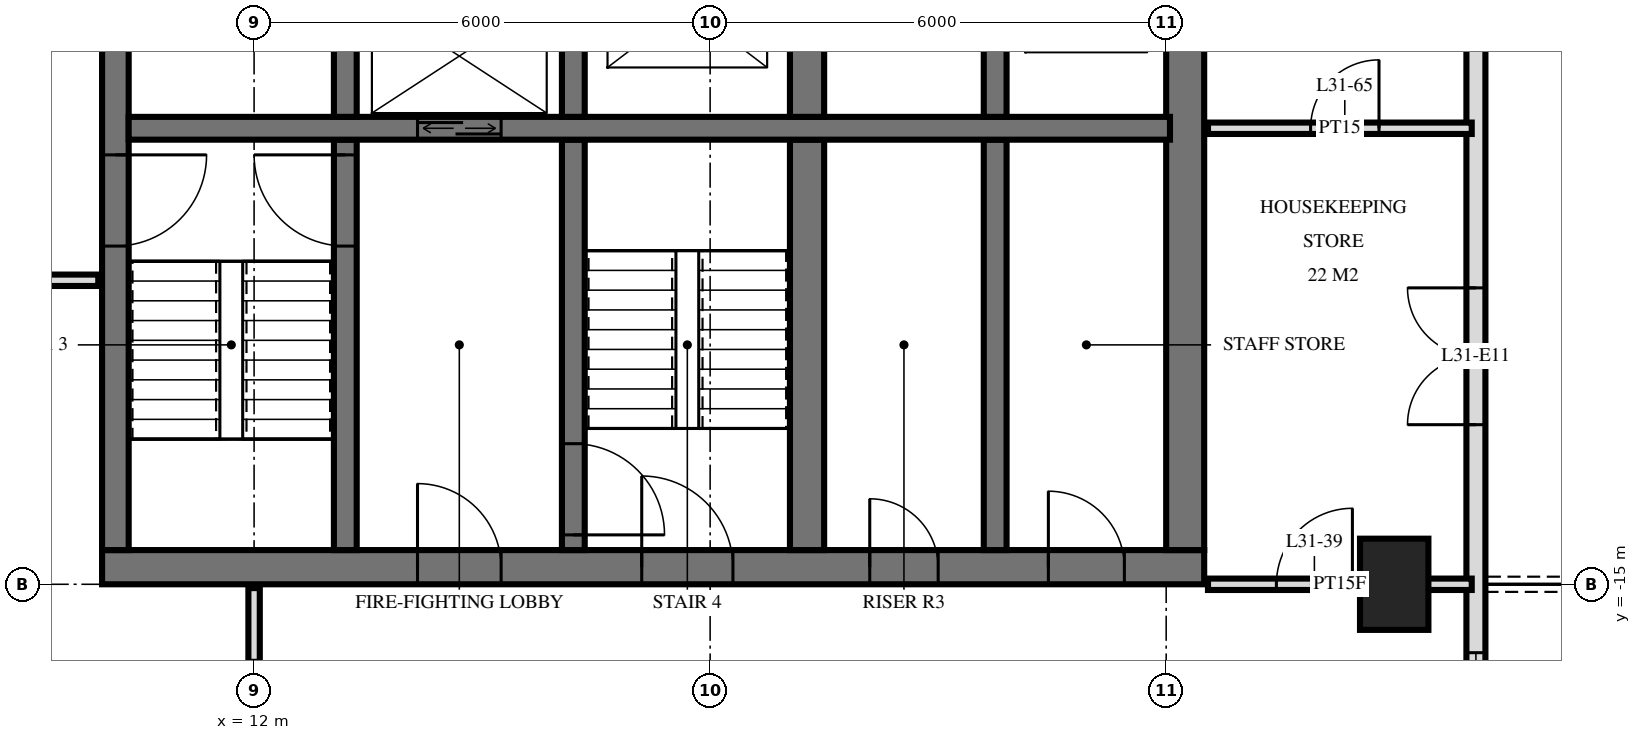
"""IFC4 building model, lengths in metres.
Left out: names, types, materials, properties, quantities, classifications, styles, units other than length and angle.
Written with IfcOpenShell. Run it as: python <this file> out.ifc"""

import sys

from ifc_helpers import new_model, si_unit, direction, frame, frame_2d, origin, origin_2d, place, context, subcontext, project, spatial, rectangle, extrude, element, fill, save


model = new_model("IFC4")
c1 = context("Model", 3, precision=1e-05, world=origin(), true_north=direction((0.0, 1.0)))
c2 = subcontext(c1, "Body", "Model", "MODEL_VIEW")
j1 = project(units=[si_unit("LENGTHUNIT", "METRE"), si_unit("PLANEANGLEUNIT", "RADIAN")], contexts=[c1])
p1 = place(None, origin())
s1 = spatial("IfcSite", under=j1, at=p1, CompositionType="ELEMENT")
p2 = place(p1, origin())
s2 = spatial("IfcBuilding", under=s1, at=p2, CompositionType="ELEMENT")
p3 = place(p2, frame((0.0, 0.0, 123.6)))
s3 = spatial("IfcBuildingStorey", under=s2, at=p3, CompositionType="ELEMENT", Elevation=123.6)
p4 = place(p3, frame((27.0, -15.0, 0.0), z_axis=(0.0, 0.0, 1.0), x_axis=(0.0, 1.0, 0.0)))
e1 = element("IfcColumn", 1, at=p4, inside=s3, PredefinedType="COLUMN", context=c2, shape_type="SweptSolid", body=[
    extrude(rectangle(XDim=1.2, YDim=0.9, at=origin_2d()), origin(), (0.0, 0.0, 1.0), 3.6),
])
p5 = place(p3, frame((10.0, -14.775, 0.0), z_axis=(0.0, 0.0, 1.0), x_axis=(1.0, 0.0, 0.0)))
e2 = element("IfcWall", 2, at=p5, inside=s3, PredefinedType="SHEAR", context=c2, shape_type="SweptSolid", body=[
    extrude(rectangle(XDim=14.5, YDim=0.45, at=frame_2d((7.25, 0.0))), origin(), (0.0, 0.0, 1.0), 3.6),
])
p6 = place(p5, frame((7.1, 0.0, 0.0)))
e3 = element("IfcOpeningElement", 3, at=p6, cuts=e2, PredefinedType="OPENING", context=c2, shape_type="SweptSolid", body=[
    extrude(rectangle(XDim=1.2, YDim=2.1, at=frame_2d((0.6, 1.05))), frame((0.0, 0.235, 0.0), z_axis=(0.0, -1.0, 0.0), x_axis=(1.0, 0.0, 0.0)), (0.0, 0.0, 1.0), 0.47),
])
p7 = place(p5, frame((4.15, 0.0, 0.0)))
e4 = element("IfcOpeningElement", 4, at=p7, cuts=e2, PredefinedType="OPENING", context=c2, shape_type="SweptSolid", body=[
    extrude(rectangle(XDim=1.1, YDim=2.1, at=frame_2d((0.55, 1.05))), frame((0.0, 0.235, 0.0), z_axis=(0.0, -1.0, 0.0), x_axis=(1.0, 0.0, 0.0)), (0.0, 0.0, 1.0), 0.47),
])
p8 = place(p5, frame((10.1, 0.0, 0.0)))
e5 = element("IfcOpeningElement", 5, at=p8, cuts=e2, PredefinedType="OPENING", context=c2, shape_type="SweptSolid", body=[
    extrude(rectangle(XDim=0.9, YDim=2.1, at=frame_2d((0.45, 1.05))), frame((0.0, 0.235, 0.0), z_axis=(0.0, -1.0, 0.0), x_axis=(1.0, 0.0, 0.0)), (0.0, 0.0, 1.0), 0.47),
])
p9 = place(p5, frame((12.45, 0.0, 0.0)))
e6 = element("IfcOpeningElement", 6, at=p9, cuts=e2, PredefinedType="OPENING", context=c2, shape_type="SweptSolid", body=[
    extrude(rectangle(XDim=1.0, YDim=2.1, at=frame_2d((0.5, 1.05))), frame((0.0, 0.235, 0.0), z_axis=(0.0, -1.0, 0.0), x_axis=(1.0, 0.0, 0.0)), (0.0, 0.0, 1.0), 0.47),
])
p10 = place(p3, frame((10.175, -14.55, 0.0), z_axis=(0.0, 0.0, 1.0), x_axis=(0.0, 1.0, 0.0)))
e7 = element("IfcWall", 7, at=p10, inside=s3, PredefinedType="SHEAR", context=c2, shape_type="SweptSolid", body=[
    extrude(rectangle(XDim=14.1, YDim=0.35, at=frame_2d((7.05, 0.0))), origin(), (0.0, 0.0, 1.0), 3.6),
])
p11 = place(p10, frame((8.4, 0.0, 0.0)))
e8 = element("IfcOpeningElement", 8, at=p11, cuts=e7, PredefinedType="OPENING", context=c2, shape_type="SweptSolid", body=[
    extrude(rectangle(XDim=1.4, YDim=2.4, at=frame_2d((0.7, 1.2))), frame((0.0, 0.185, 0.0), z_axis=(0.0, -1.0, 0.0), x_axis=(1.0, 0.0, 0.0)), (0.0, 0.0, 1.0), 0.37),
])
p12 = place(p10, frame((10.0, 0.0, 0.0)))
e9 = element("IfcOpeningElement", 9, at=p12, cuts=e7, PredefinedType="OPENING", context=c2, shape_type="SweptSolid", body=[
    extrude(rectangle(XDim=1.4, YDim=2.4, at=frame_2d((0.7, 1.2))), frame((0.0, 0.185, 0.0), z_axis=(0.0, -1.0, 0.0), x_axis=(1.0, 0.0, 0.0)), (0.0, 0.0, 1.0), 0.37),
])
p13 = place(p10, frame((4.0, 0.0, 0.0)))
e10 = element("IfcOpeningElement", 10, at=p13, cuts=e7, PredefinedType="OPENING", context=c2, shape_type="SweptSolid", body=[
    extrude(rectangle(XDim=1.2, YDim=2.1, at=frame_2d((0.6, 1.05))), frame((0.0, 0.185, 0.0), z_axis=(0.0, -1.0, 0.0), x_axis=(1.0, 0.0, 0.0)), (0.0, 0.0, 1.0), 0.37),
])
p14 = place(p3, frame((24.25, -14.55, 0.0), z_axis=(0.0, 0.0, 1.0), x_axis=(0.0, 1.0, 0.0)))
e11 = element("IfcWall", 11, at=p14, inside=s3, PredefinedType="SHEAR", context=c2, shape_type="SweptSolid", body=[
    extrude(rectangle(XDim=14.1, YDim=0.5, at=frame_2d((7.05, 0.0))), origin(), (0.0, 0.0, 1.0), 3.6),
])
p15 = place(p3, frame((10.35, -9.0, 0.0), z_axis=(0.0, 0.0, 1.0), x_axis=(1.0, 0.0, 0.0)))
e12 = element("IfcWall", 12, at=p15, inside=s3, PredefinedType="SHEAR", context=c2, shape_type="SweptSolid", body=[
    extrude(rectangle(XDim=13.7, YDim=0.3, at=frame_2d((6.85, 0.0))), origin(), (0.0, 0.0, 1.0), 3.6),
])
p16 = place(p15, frame((3.8, 0.0, 0.0)))
e13 = element("IfcOpeningElement", 13, at=p16, cuts=e12, PredefinedType="OPENING", context=c2, shape_type="SweptSolid", body=[
    extrude(rectangle(XDim=1.1, YDim=2.1, at=frame_2d((0.55, 1.05))), frame((0.0, 0.16, 0.0), z_axis=(0.0, -1.0, 0.0), x_axis=(1.0, 0.0, 0.0)), (0.0, 0.0, 1.0), 0.32),
])
p17 = place(p3, frame((13.2, -8.85, 0.0), z_axis=(0.0, 0.0, 1.0), x_axis=(0.0, 1.0, 0.0)))
e14 = element("IfcWall", 14, at=p17, inside=s3, PredefinedType="SHEAR", context=c2, shape_type="SweptSolid", body=[
    extrude(rectangle(XDim=2.3, YDim=0.3, at=frame_2d((1.15, 0.0))), origin(), (0.0, 0.0, 1.0), 3.6),
])
p18 = place(p3, frame((13.2, -14.55, 0.0), z_axis=(0.0, 0.0, 1.0), x_axis=(0.0, 1.0, 0.0)))
e15 = element("IfcWall", 15, at=p18, inside=s3, PredefinedType="SHEAR", context=c2, shape_type="SweptSolid", body=[
    extrude(rectangle(XDim=5.4, YDim=0.3, at=frame_2d((2.7, 0.0))), origin(), (0.0, 0.0, 1.0), 3.6),
])
p19 = place(p18, frame((4.0, 0.0, 0.0)))
e16 = element("IfcOpeningElement", 16, at=p19, cuts=e15, PredefinedType="OPENING", context=c2, shape_type="SweptSolid", body=[
    extrude(rectangle(XDim=1.2, YDim=2.1, at=frame_2d((0.6, 1.05))), frame((0.0, 0.16, 0.0), z_axis=(0.0, -1.0, 0.0), x_axis=(1.0, 0.0, 0.0)), (0.0, 0.0, 1.0), 0.32),
])
p20 = place(p3, frame((16.2, -8.85, 0.0), z_axis=(0.0, 0.0, 1.0), x_axis=(0.0, 1.0, 0.0)))
e17 = element("IfcWall", 17, at=p20, inside=s3, PredefinedType="SHEAR", context=c2, shape_type="SweptSolid", body=[
    extrude(rectangle(XDim=2.3, YDim=0.3, at=frame_2d((1.15, 0.0))), origin(), (0.0, 0.0, 1.0), 3.6),
])
p21 = place(p3, frame((16.2, -14.55, 0.0), z_axis=(0.0, 0.0, 1.0), x_axis=(0.0, 1.0, 0.0)))
e18 = element("IfcWall", 18, at=p21, inside=s3, PredefinedType="SHEAR", context=c2, shape_type="SweptSolid", body=[
    extrude(rectangle(XDim=5.4, YDim=0.3, at=frame_2d((2.7, 0.0))), origin(), (0.0, 0.0, 1.0), 3.6),
])
p22 = place(p21, frame((0.2, 0.0, 0.0)))
e19 = element("IfcOpeningElement", 19, at=p22, cuts=e18, PredefinedType="OPENING", context=c2, shape_type="SweptSolid", body=[
    extrude(rectangle(XDim=1.2, YDim=2.1, at=frame_2d((0.6, 1.05))), frame((0.0, 0.16, 0.0), z_axis=(0.0, -1.0, 0.0), x_axis=(1.0, 0.0, 0.0)), (0.0, 0.0, 1.0), 0.32),
])
p23 = place(p3, frame((19.275, -8.85, 0.0), z_axis=(0.0, 0.0, 1.0), x_axis=(0.0, 1.0, 0.0)))
e20 = element("IfcWall", 20, at=p23, inside=s3, PredefinedType="SHEAR", context=c2, shape_type="SweptSolid", body=[
    extrude(rectangle(XDim=2.3, YDim=0.45, at=frame_2d((1.15, 0.0))), origin(), (0.0, 0.0, 1.0), 3.6),
])
p24 = place(p3, frame((19.275, -14.55, 0.0), z_axis=(0.0, 0.0, 1.0), x_axis=(0.0, 1.0, 0.0)))
e21 = element("IfcWall", 21, at=p24, inside=s3, PredefinedType="SHEAR", context=c2, shape_type="SweptSolid", body=[
    extrude(rectangle(XDim=5.4, YDim=0.45, at=frame_2d((2.7, 0.0))), origin(), (0.0, 0.0, 1.0), 3.6),
])
p25 = place(p3, frame((21.75, -8.85, 0.0), z_axis=(0.0, 0.0, 1.0), x_axis=(0.0, 1.0, 0.0)))
e22 = element("IfcWall", 22, at=p25, inside=s3, PredefinedType="SHEAR", context=c2, shape_type="SweptSolid", body=[
    extrude(rectangle(XDim=2.3, YDim=0.3, at=frame_2d((1.15, 0.0))), origin(), (0.0, 0.0, 1.0), 3.6),
])
p26 = place(p3, frame((21.75, -14.55, 0.0), z_axis=(0.0, 0.0, 1.0), x_axis=(0.0, 1.0, 0.0)))
e23 = element("IfcWall", 23, at=p26, inside=s3, PredefinedType="SHEAR", context=c2, shape_type="SweptSolid", body=[
    extrude(rectangle(XDim=5.4, YDim=0.3, at=frame_2d((2.7, 0.0))), origin(), (0.0, 0.0, 1.0), 3.6),
])
p27 = place(p3, frame((28.075, -29.275, 0.0), z_axis=(0.0, 0.0, 1.0), x_axis=(0.0, 1.0, 0.0)))
e24 = element("IfcWall", 24, at=p27, inside=s3, PredefinedType="SOLIDWALL", context=c2, shape_type="SweptSolid", body=[
    extrude(rectangle(XDim=25.951, YDim=0.25, at=frame_2d((12.975, 0.0))), origin(), (0.0, 0.0, 1.0), 3.32),
])
p28 = place(p27, frame((0.575, 0.0, 0.0)))
e25 = element("IfcOpeningElement", 25, at=p28, cuts=e24, PredefinedType="OPENING", context=c2, shape_type="SweptSolid", body=[
    extrude(rectangle(XDim=1.8, YDim=2.4, at=frame_2d((0.9, 1.2))), frame((0.0, 0.135, 0.0), z_axis=(0.0, -1.0, 0.0), x_axis=(1.0, 0.0, 0.0)), (0.0, 0.0, 1.0), 0.27),
])
p29 = place(p27, frame((3.325, 0.0, 0.3)))
e26 = element("IfcOpeningElement", 26, at=p29, cuts=e24, PredefinedType="OPENING", context=c2, shape_type="SweptSolid", body=[
    extrude(rectangle(XDim=1.8, YDim=2.1, at=frame_2d((0.9, 1.05))), frame((0.0, 0.135, 0.0), z_axis=(0.0, -1.0, 0.0), x_axis=(1.0, 0.0, 0.0)), (0.0, 0.0, 1.0), 0.27),
])
p30 = place(p27, frame((8.275, 0.0, 0.0)))
e27 = element("IfcOpeningElement", 27, at=p30, cuts=e24, PredefinedType="OPENING", context=c2, shape_type="SweptSolid", body=[
    extrude(rectangle(XDim=1.8, YDim=2.4, at=frame_2d((0.9, 1.2))), frame((0.0, 0.135, 0.0), z_axis=(0.0, -1.0, 0.0), x_axis=(1.0, 0.0, 0.0)), (0.0, 0.0, 1.0), 0.27),
])
p31 = place(p27, frame((12.175, 0.0, 0.3)))
e28 = element("IfcOpeningElement", 28, at=p31, cuts=e24, PredefinedType="OPENING", context=c2, shape_type="SweptSolid", body=[
    extrude(rectangle(XDim=1.2, YDim=2.1, at=frame_2d((0.6, 1.05))), frame((0.0, 0.135, 0.0), z_axis=(0.0, -1.0, 0.0), x_axis=(1.0, 0.0, 0.0)), (0.0, 0.0, 1.0), 0.27),
])
p32 = place(p27, frame((16.375, 0.0, 0.0)))
e29 = element("IfcOpeningElement", 29, at=p32, cuts=e24, PredefinedType="OPENING", context=c2, shape_type="SweptSolid", body=[
    extrude(rectangle(XDim=1.8, YDim=2.4, at=frame_2d((0.9, 1.2))), frame((0.0, 0.135, 0.0), z_axis=(0.0, -1.0, 0.0), x_axis=(1.0, 0.0, 0.0)), (0.0, 0.0, 1.0), 0.27),
])
p33 = place(p3, frame((12.0, -18.0, 0.0), z_axis=(0.0, 0.0, 1.0), x_axis=(0.0, 1.0, 0.0)))
e30 = element("IfcWall", 30, at=p33, inside=s3, PredefinedType="PARTITIONING", context=c2, shape_type="SweptSolid", body=[
    extrude(rectangle(XDim=2.95, YDim=0.15, at=frame_2d((1.475, 0.0))), origin(), (0.0, 0.0, 1.0), 3.32),
])
p34 = place(p33, frame((1.0, 0.0, 0.0)))
e31 = element("IfcOpeningElement", 31, at=p34, cuts=e30, PredefinedType="OPENING", context=c2, shape_type="SweptSolid", body=[
    extrude(rectangle(XDim=1.0, YDim=2.1, at=frame_2d((0.5, 1.05))), frame((0.0, 0.085, 0.0), z_axis=(0.0, -1.0, 0.0), x_axis=(1.0, 0.0, 0.0)), (0.0, 0.0, 1.0), 0.17),
])
p35 = place(p3, frame((24.55, -15.0, 0.0), z_axis=(0.0, 0.0, 1.0), x_axis=(1.0, 0.0, 0.0)))
e32 = element("IfcWall", 32, at=p35, inside=s3, PredefinedType="PARTITIONING", context=c2, shape_type="SweptSolid", body=[
    extrude(rectangle(XDim=3.47, YDim=0.15, at=frame_2d((1.735, 0.0))), origin(), (0.0, 0.0, 1.0), 3.32),
])
p36 = place(p35, frame((0.9, 0.0, 0.0)))
e33 = element("IfcOpeningElement", 33, at=p36, cuts=e32, PredefinedType="OPENING", context=c2, shape_type="SweptSolid", body=[
    extrude(rectangle(XDim=1.0, YDim=2.1, at=frame_2d((0.5, 1.05))), frame((0.0, 0.085, 0.0), z_axis=(0.0, -1.0, 0.0), x_axis=(1.0, 0.0, 0.0)), (0.0, 0.0, 1.0), 0.17),
])
p37 = place(p3, frame((-9.95, -11.0, 0.0), z_axis=(0.0, 0.0, 1.0), x_axis=(1.0, 0.0, 0.0)))
e34 = element("IfcWall", 34, at=p37, inside=s3, PredefinedType="PARTITIONING", context=c2, shape_type="SweptSolid", body=[
    extrude(rectangle(XDim=19.9, YDim=0.15, at=frame_2d((9.95, 0.0))), origin(), (0.0, 0.0, 1.0), 3.32),
])
p38 = place(p37, frame((9.45, 0.0, 0.0)))
e35 = element("IfcOpeningElement", 35, at=p38, cuts=e34, PredefinedType="OPENING", context=c2, shape_type="SweptSolid", body=[
    extrude(rectangle(XDim=1.0, YDim=2.1, at=frame_2d((0.5, 1.05))), frame((0.0, 0.085, 0.0), z_axis=(0.0, -1.0, 0.0), x_axis=(1.0, 0.0, 0.0)), (0.0, 0.0, 1.0), 0.17),
])
p39 = place(p37, frame((3.45, 0.0, 0.0)))
e36 = element("IfcOpeningElement", 36, at=p39, cuts=e34, PredefinedType="OPENING", context=c2, shape_type="SweptSolid", body=[
    extrude(rectangle(XDim=1.0, YDim=2.1, at=frame_2d((0.5, 1.05))), frame((0.0, 0.085, 0.0), z_axis=(0.0, -1.0, 0.0), x_axis=(1.0, 0.0, 0.0)), (0.0, 0.0, 1.0), 0.17),
])
p40 = place(p3, frame((24.55, -9.0, 0.0), z_axis=(0.0, 0.0, 1.0), x_axis=(1.0, 0.0, 0.0)))
e37 = element("IfcWall", 37, at=p40, inside=s3, PredefinedType="PARTITIONING", context=c2, shape_type="SweptSolid", body=[
    extrude(rectangle(XDim=3.47, YDim=0.15, at=frame_2d((1.735, 0.0))), origin(), (0.0, 0.0, 1.0), 3.32),
])
p41 = place(p40, frame((1.35, 0.0, 0.0)))
e38 = element("IfcOpeningElement", 38, at=p41, cuts=e37, PredefinedType="OPENING", context=c2, shape_type="SweptSolid", body=[
    extrude(rectangle(XDim=0.9, YDim=2.1, at=frame_2d((0.45, 1.05))), frame((0.0, 0.085, 0.0), z_axis=(0.0, -1.0, 0.0), x_axis=(1.0, 0.0, 0.0)), (0.0, 0.0, 1.0), 0.17),
])
p42 = place(p31, origin())
e39 = element("IfcWindow", 39, at=p42, inside=s3, PartitioningType="SINGLE_PANEL", PredefinedType="WINDOW", context=c2, shape_type="SweptSolid", body=[
    extrude(rectangle(XDim=1.2, YDim=2.1, at=frame_2d((0.6, 1.05))), frame((0.0, 0.03, 0.0), z_axis=(0.0, -1.0, 0.0), x_axis=(1.0, 0.0, 0.0)), (0.0, 0.0, 1.0), 0.06),
])
fill(e28, e39)
p43 = place(p32, origin())
e40 = element("IfcDoor", 40, at=p43, inside=s3, OperationType="DOUBLE_DOOR_SINGLE_SWING", PredefinedType="DOOR", context=c2, shape_type="SweptSolid", body=[
    extrude(rectangle(XDim=1.8, YDim=2.4, at=frame_2d((0.9, 1.2))), frame((0.0, 0.025, 0.0), z_axis=(0.0, -1.0, 0.0), x_axis=(1.0, 0.0, 0.0)), (0.0, 0.0, 1.0), 0.05),
])
fill(e29, e40)
p44 = place(p16, origin())
e41 = element("IfcDoor", 41, at=p44, inside=s3, OperationType="DOUBLE_DOOR_SLIDING", PredefinedType="USERDEFINED", context=c2, shape_type="SweptSolid", body=[
    extrude(rectangle(XDim=1.1, YDim=2.1, at=frame_2d((0.55, 1.05))), frame((0.0, 0.025, 0.0), z_axis=(0.0, -1.0, 0.0), x_axis=(1.0, 0.0, 0.0)), (0.0, 0.0, 1.0), 0.05),
])
fill(e13, e41)
p45 = place(p13, frame((0.6, 0.0, 0.0), z_axis=(0.0, 0.0, 1.0), x_axis=(-1.0, 0.0, 0.0)))
e42 = element("IfcDoor", 42, at=p45, inside=s3, OperationType="SINGLE_SWING_RIGHT", PredefinedType="DOOR", context=c2, shape_type="SweptSolid", body=[
    extrude(rectangle(XDim=1.2, YDim=2.1, at=frame_2d((0.0, 1.05))), frame((0.0, -0.025, 0.0), z_axis=(0.0, 1.0, 0.0), x_axis=(-1.0, 0.0, 0.0)), (0.0, 0.0, 1.0), 0.05),
])
fill(e10, e42)
p46 = place(p6, origin())
e43 = element("IfcDoor", 43, at=p46, inside=s3, OperationType="SINGLE_SWING_RIGHT", PredefinedType="DOOR", context=c2, shape_type="SweptSolid", body=[
    extrude(rectangle(XDim=1.2, YDim=2.1, at=frame_2d((0.6, 1.05))), frame((0.0, 0.025, 0.0), z_axis=(0.0, -1.0, 0.0), x_axis=(1.0, 0.0, 0.0)), (0.0, 0.0, 1.0), 0.05),
])
fill(e3, e43)
p47 = place(p7, origin())
e44 = element("IfcDoor", 44, at=p47, inside=s3, OperationType="SINGLE_SWING_RIGHT", PredefinedType="DOOR", context=c2, shape_type="SweptSolid", body=[
    extrude(rectangle(XDim=1.1, YDim=2.1, at=frame_2d((0.55, 1.05))), frame((0.0, 0.025, 0.0), z_axis=(0.0, -1.0, 0.0), x_axis=(1.0, 0.0, 0.0)), (0.0, 0.0, 1.0), 0.05),
])
fill(e4, e44)
p48 = place(p8, origin())
e45 = element("IfcDoor", 45, at=p48, inside=s3, OperationType="SINGLE_SWING_RIGHT", PredefinedType="DOOR", context=c2, shape_type="SweptSolid", body=[
    extrude(rectangle(XDim=0.9, YDim=2.1, at=frame_2d((0.45, 1.05))), frame((0.0, 0.025, 0.0), z_axis=(0.0, -1.0, 0.0), x_axis=(1.0, 0.0, 0.0)), (0.0, 0.0, 1.0), 0.05),
])
fill(e5, e45)
p49 = place(p9, origin())
e46 = element("IfcDoor", 46, at=p49, inside=s3, OperationType="SINGLE_SWING_RIGHT", PredefinedType="DOOR", context=c2, shape_type="SweptSolid", body=[
    extrude(rectangle(XDim=1.0, YDim=2.1, at=frame_2d((0.5, 1.05))), frame((0.0, 0.025, 0.0), z_axis=(0.0, -1.0, 0.0), x_axis=(1.0, 0.0, 0.0)), (0.0, 0.0, 1.0), 0.05),
])
fill(e6, e46)
p50 = place(p19, origin())
e47 = element("IfcDoor", 47, at=p50, inside=s3, OperationType="SINGLE_SWING_LEFT", PredefinedType="DOOR", context=c2, shape_type="SweptSolid", body=[
    extrude(rectangle(XDim=1.2, YDim=2.1, at=frame_2d((0.6, 1.05))), frame((0.0, 0.025, 0.0), z_axis=(0.0, -1.0, 0.0), x_axis=(1.0, 0.0, 0.0)), (0.0, 0.0, 1.0), 0.05),
])
fill(e16, e47)
p51 = place(p22, frame((0.6, 0.0, 0.0), z_axis=(0.0, 0.0, 1.0), x_axis=(-1.0, 0.0, 0.0)))
e48 = element("IfcDoor", 48, at=p51, inside=s3, OperationType="SINGLE_SWING_LEFT", PredefinedType="DOOR", context=c2, shape_type="SweptSolid", body=[
    extrude(rectangle(XDim=1.2, YDim=2.1, at=frame_2d((0.0, 1.05))), frame((0.0, -0.025, 0.0), z_axis=(0.0, 1.0, 0.0), x_axis=(-1.0, 0.0, 0.0)), (0.0, 0.0, 1.0), 0.05),
])
fill(e19, e48)
p52 = place(p36, origin())
e49 = element("IfcDoor", 49, at=p52, inside=s3, OperationType="SINGLE_SWING_LEFT", PredefinedType="DOOR", context=c2, shape_type="SweptSolid", body=[
    extrude(rectangle(XDim=1.0, YDim=2.1, at=frame_2d((0.5, 1.05))), frame((0.0, 0.025, 0.0), z_axis=(0.0, -1.0, 0.0), x_axis=(1.0, 0.0, 0.0)), (0.0, 0.0, 1.0), 0.05),
])
fill(e33, e49)
p53 = place(p41, origin())
e50 = element("IfcDoor", 50, at=p53, inside=s3, OperationType="SINGLE_SWING_LEFT", PredefinedType="DOOR", context=c2, shape_type="SweptSolid", body=[
    extrude(rectangle(XDim=0.9, YDim=2.1, at=frame_2d((0.45, 1.05))), frame((0.0, 0.025, 0.0), z_axis=(0.0, -1.0, 0.0), x_axis=(1.0, 0.0, 0.0)), (0.0, 0.0, 1.0), 0.05),
])
fill(e38, e50)
save(model, sys.argv[1])
